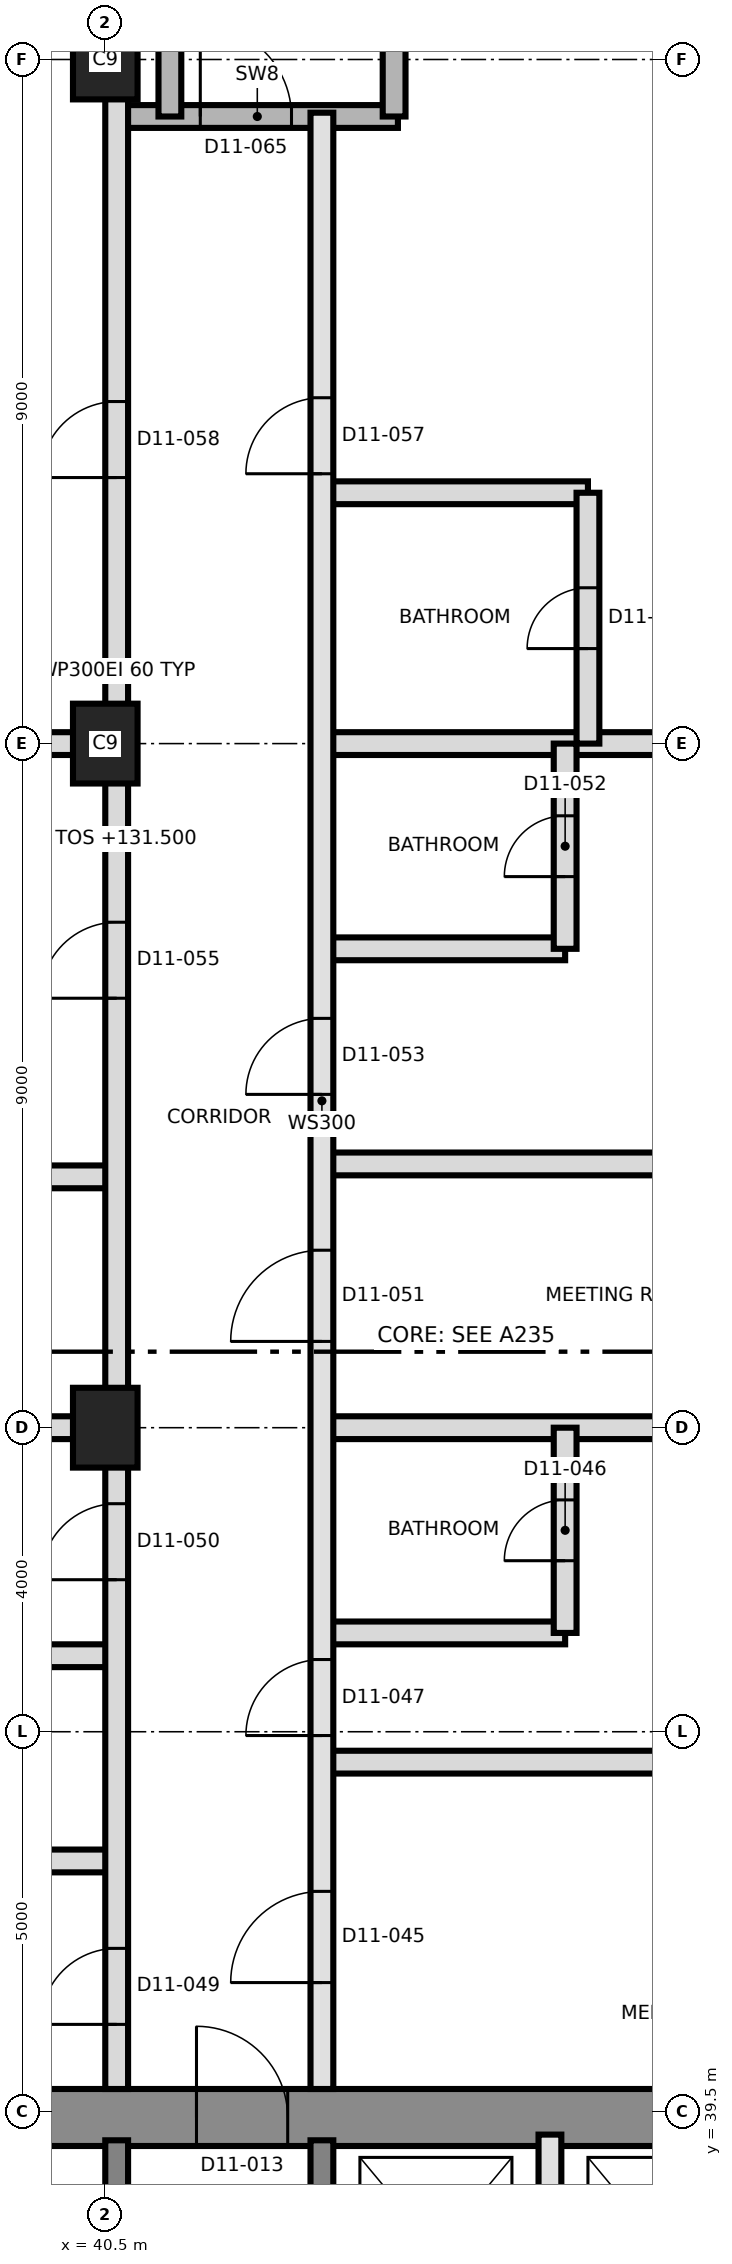
"""IFC4 building model, lengths in metres.
Left out: names, types, materials, properties, quantities, classifications, styles, units other than length and angle.
Written with IfcOpenShell. Run it as: python <this file> out.ifc"""

import sys

from ifc_helpers import new_model, si_unit, direction, frame, frame_2d, origin, origin_2d, place, context, subcontext, project, spatial, rectangle, extrude, element, fill, save


model = new_model("IFC4")
c1 = context("Model", 3, precision=1e-05, world=origin(), true_north=direction((0.0, 1.0)))
c2 = subcontext(c1, "Body", "Model", "MODEL_VIEW")
j1 = project(units=[si_unit("LENGTHUNIT", "METRE"), si_unit("PLANEANGLEUNIT", "RADIAN")], contexts=[c1])
p1 = place(None, origin())
s1 = spatial("IfcSite", under=j1, at=p1, CompositionType="ELEMENT")
p2 = place(p1, origin())
s2 = spatial("IfcBuilding", under=s1, at=p2, CompositionType="ELEMENT")
p3 = place(p2, frame((0.0, 0.0, 131.5)))
s3 = spatial("IfcBuildingStorey", under=s2, at=p3, CompositionType="ELEMENT", Elevation=131.5)
p4 = place(p3, frame((31.125, 39.425, 0.0), z_axis=(0.0, 0.0, 1.0), x_axis=(1.0, 0.0, 0.0)))
e1 = element("IfcWall", 1, at=p4, inside=s3, PredefinedType="SHEAR", context=c2, shape_type="SweptSolid", body=[
    extrude(rectangle(XDim=27.0, YDim=0.75, at=frame_2d((13.5, 0.0))), origin(), (0.0, 0.0, 1.0), 3.7),
])
p5 = place(p4, frame((10.575, 0.0, 0.0)))
e2 = element("IfcOpeningElement", 2, at=p5, cuts=e1, PredefinedType="OPENING", context=c2, shape_type="SweptSolid", body=[
    extrude(rectangle(XDim=1.2, YDim=2.1, at=frame_2d((0.6, 1.05))), frame((0.0, 0.385, 0.0), z_axis=(0.0, -1.0, 0.0), x_axis=(1.0, 0.0, 0.0)), (0.0, 0.0, 1.0), 0.77),
])
for number, where, z_axis, x_axis in (
    (3, (40.65, 33.5, 0.0), (0.0, 0.0, 1.0), (0.0, 1.0, 0.0)),
    (4, (43.35, 33.5, 0.0), (0.0, 0.0, 1.0), (0.0, 1.0, 0.0)),
):
    element("IfcWall", number, at=place(p3, frame(where, z_axis=z_axis, x_axis=x_axis)), inside=s3, PredefinedType="SHEAR", context=c2, shape_type="SweptSolid", body=[
        extrude(rectangle(XDim=5.625, YDim=0.3, at=frame_2d((2.812, 0.0))), origin(), (0.0, 0.0, 1.0), 3.7),
    ])
for number, where, z_axis, x_axis in (
    (5, (40.5, 48.5, 0.0), (0.0, 0.0, 1.0), (0.0, 1.0, 0.0)),
    (6, (40.5, 57.5, 0.0), (0.0, 0.0, 1.0), (0.0, 1.0, 0.0)),
    (7, (40.5, 66.5, 0.0), (0.0, 0.0, 1.0), (0.0, 1.0, 0.0)),
):
    element("IfcColumn", number, at=place(p3, frame(where, z_axis=z_axis, x_axis=x_axis)), inside=s3, PredefinedType="COLUMN", context=c2, shape_type="SweptSolid", body=[
        extrude(rectangle(XDim=1.05, YDim=0.85, at=origin_2d()), origin(), (0.0, 0.0, 1.0), 3.7),
    ])
p6 = place(p3, frame((46.35, 36.2, 0.0), z_axis=(0.0, 0.0, 1.0), x_axis=(0.0, 1.0, 0.0)))
e8 = element("IfcWall", 8, at=p6, inside=s3, PredefinedType="SOLIDWALL", context=c2, shape_type="SweptSolid", body=[
    extrude(rectangle(XDim=3.0, YDim=0.3, at=frame_2d((1.5, 0.0))), origin(), (0.0, 0.0, 1.0), 3.4),
])
p7 = place(p3, frame((37.45, 42.8, 0.0), z_axis=(0.0, 0.0, 1.0), x_axis=(1.0, 0.0, 0.0)))
e9 = element("IfcWall", 9, at=p7, inside=s3, PredefinedType="PARTITIONING", context=c2, shape_type="SweptSolid", body=[
    extrude(rectangle(XDim=3.2, YDim=0.3, at=frame_2d((1.6, 0.0))), origin(), (0.0, 0.0, 1.0), 3.4),
])
p8 = place(p3, frame((43.35, 44.1, 0.0), z_axis=(0.0, 0.0, 1.0), x_axis=(1.0, 0.0, 0.0)))
e10 = element("IfcWall", 10, at=p8, inside=s3, PredefinedType="PARTITIONING", context=c2, shape_type="SweptSolid", body=[
    extrude(rectangle(XDim=8.032, YDim=0.3, at=frame_2d((4.016, 0.0))), origin(), (0.0, 0.0, 1.0), 3.35),
])
p9 = place(p3, frame((30.135, 45.5, 0.0), z_axis=(0.0, 0.0, 1.0), x_axis=(1.0, 0.0, 0.0)))
e11 = element("IfcWall", 11, at=p9, inside=s3, PredefinedType="PARTITIONING", context=c2, shape_type="SweptSolid", body=[
    extrude(rectangle(XDim=10.515, YDim=0.3, at=frame_2d((5.257, 0.0))), origin(), (0.0, 0.0, 1.0), 3.35),
])
p10 = place(p3, frame((43.35, 45.8, 0.0), z_axis=(0.0, 0.0, 1.0), x_axis=(1.0, 0.0, 0.0)))
e12 = element("IfcWall", 12, at=p10, inside=s3, PredefinedType="PARTITIONING", context=c2, shape_type="SweptSolid", body=[
    extrude(rectangle(XDim=3.2, YDim=0.3, at=frame_2d((1.6, 0.0))), origin(), (0.0, 0.0, 1.0), 3.4),
])
p11 = place(p3, frame((30.135, 48.5, 0.0), z_axis=(0.0, 0.0, 1.0), x_axis=(1.0, 0.0, 0.0)))
e13 = element("IfcWall", 13, at=p11, inside=s3, PredefinedType="PARTITIONING", context=c2, shape_type="SweptSolid", body=[
    extrude(rectangle(XDim=10.515, YDim=0.3, at=frame_2d((5.257, 0.0))), origin(), (0.0, 0.0, 1.0), 3.35),
])
p12 = place(p3, frame((43.35, 48.5, 0.0), z_axis=(0.0, 0.0, 1.0), x_axis=(1.0, 0.0, 0.0)))
e14 = element("IfcWall", 14, at=p12, inside=s3, PredefinedType="PARTITIONING", context=c2, shape_type="SweptSolid", body=[
    extrude(rectangle(XDim=7.695, YDim=0.3, at=frame_2d((3.847, 0.0))), origin(), (0.0, 0.0, 1.0), 3.35),
])
p13 = place(p3, frame((37.15, 51.8, 0.0), z_axis=(0.0, 0.0, 1.0), x_axis=(1.0, 0.0, 0.0)))
e15 = element("IfcWall", 15, at=p13, inside=s3, PredefinedType="PARTITIONING", context=c2, shape_type="SweptSolid", body=[
    extrude(rectangle(XDim=3.5, YDim=0.3, at=frame_2d((1.75, 0.0))), origin(), (0.0, 0.0, 1.0), 3.4),
])
p14 = place(p3, frame((43.35, 51.97, 0.0), z_axis=(0.0, 0.0, 1.0), x_axis=(1.0, 0.0, 0.0)))
e16 = element("IfcWall", 16, at=p14, inside=s3, PredefinedType="PARTITIONING", context=c2, shape_type="SweptSolid", body=[
    extrude(rectangle(XDim=7.695, YDim=0.3, at=frame_2d((3.847, 0.0))), origin(), (0.0, 0.0, 1.0), 3.35),
])
p15 = place(p3, frame((43.35, 54.8, 0.0), z_axis=(0.0, 0.0, 1.0), x_axis=(1.0, 0.0, 0.0)))
e17 = element("IfcWall", 17, at=p15, inside=s3, PredefinedType="PARTITIONING", context=c2, shape_type="SweptSolid", body=[
    extrude(rectangle(XDim=3.2, YDim=0.3, at=frame_2d((1.6, 0.0))), origin(), (0.0, 0.0, 1.0), 3.4),
])
p16 = place(p3, frame((30.135, 57.5, 0.0), z_axis=(0.0, 0.0, 1.0), x_axis=(1.0, 0.0, 0.0)))
e18 = element("IfcWall", 18, at=p16, inside=s3, PredefinedType="PARTITIONING", context=c2, shape_type="SweptSolid", body=[
    extrude(rectangle(XDim=10.515, YDim=0.3, at=frame_2d((5.257, 0.0))), origin(), (0.0, 0.0, 1.0), 3.35),
])
p17 = place(p3, frame((43.35, 57.5, 0.0), z_axis=(0.0, 0.0, 1.0), x_axis=(1.0, 0.0, 0.0)))
e19 = element("IfcWall", 19, at=p17, inside=s3, PredefinedType="PARTITIONING", context=c2, shape_type="SweptSolid", body=[
    extrude(rectangle(XDim=7.695, YDim=0.3, at=frame_2d((3.847, 0.0))), origin(), (0.0, 0.0, 1.0), 3.35),
])
p18 = place(p3, frame((43.35, 60.8, 0.0), z_axis=(0.0, 0.0, 1.0), x_axis=(1.0, 0.0, 0.0)))
e20 = element("IfcWall", 20, at=p18, inside=s3, PredefinedType="PARTITIONING", context=c2, shape_type="SweptSolid", body=[
    extrude(rectangle(XDim=3.5, YDim=0.3, at=frame_2d((1.75, 0.0))), origin(), (0.0, 0.0, 1.0), 3.4),
])
p19 = place(p3, frame((40.65, 65.75, 0.0), z_axis=(0.0, 0.0, 1.0), x_axis=(1.0, 0.0, 0.0)))
e21 = element("IfcWall", 21, at=p19, inside=s3, PredefinedType="SHEAR", context=c2, shape_type="SweptSolid", body=[
    extrude(rectangle(XDim=3.7, YDim=0.3, at=frame_2d((1.85, 0.0))), origin(), (0.0, 0.0, 1.0), 3.4),
])
p20 = place(p19, frame((1.1, 0.0, 0.0)))
e22 = element("IfcOpeningElement", 22, at=p20, cuts=e21, PredefinedType="OPENING", context=c2, shape_type="SweptSolid", body=[
    extrude(rectangle(XDim=1.2, YDim=2.1, at=frame_2d((0.6, 1.05))), frame((0.0, 0.16, 0.0), z_axis=(0.0, -1.0, 0.0), x_axis=(1.0, 0.0, 0.0)), (0.0, 0.0, 1.0), 0.32),
])
p21 = place(p3, frame((40.65, 39.8, 0.0), z_axis=(0.0, 0.0, 1.0), x_axis=(0.0, 1.0, 0.0)))
e23 = element("IfcWall", 23, at=p21, inside=s3, PredefinedType="PARTITIONING", context=c2, shape_type="SweptSolid", body=[
    extrude(rectangle(XDim=37.305, YDim=0.3, at=frame_2d((18.652, 0.0))), origin(), (0.0, 0.0, 1.0), 3.35),
])
p22 = place(p21, frame((0.85, 0.0, 0.0)))
e24 = element("IfcOpeningElement", 24, at=p22, cuts=e23, PredefinedType="OPENING", context=c2, shape_type="SweptSolid", body=[
    extrude(rectangle(XDim=1.0, YDim=2.1, at=frame_2d((0.5, 1.05))), frame((0.0, 0.16, 0.0), z_axis=(0.0, -1.0, 0.0), x_axis=(1.0, 0.0, 0.0)), (0.0, 0.0, 1.0), 0.32),
])
p23 = place(p21, frame((6.7, 0.0, 0.0)))
e25 = element("IfcOpeningElement", 25, at=p23, cuts=e23, PredefinedType="OPENING", context=c2, shape_type="SweptSolid", body=[
    extrude(rectangle(XDim=1.0, YDim=2.1, at=frame_2d((0.5, 1.05))), frame((0.0, 0.16, 0.0), z_axis=(0.0, -1.0, 0.0), x_axis=(1.0, 0.0, 0.0)), (0.0, 0.0, 1.0), 0.32),
])
p24 = place(p21, frame((14.35, 0.0, 0.0)))
e26 = element("IfcOpeningElement", 26, at=p24, cuts=e23, PredefinedType="OPENING", context=c2, shape_type="SweptSolid", body=[
    extrude(rectangle(XDim=1.0, YDim=2.4, at=frame_2d((0.5, 1.2))), frame((0.0, 0.16, 0.0), z_axis=(0.0, -1.0, 0.0), x_axis=(1.0, 0.0, 0.0)), (0.0, 0.0, 1.0), 0.32),
])
p25 = place(p21, frame((21.2, 0.0, 0.0)))
e27 = element("IfcOpeningElement", 27, at=p25, cuts=e23, PredefinedType="OPENING", context=c2, shape_type="SweptSolid", body=[
    extrude(rectangle(XDim=1.0, YDim=2.4, at=frame_2d((0.5, 1.2))), frame((0.0, 0.16, 0.0), z_axis=(0.0, -1.0, 0.0), x_axis=(1.0, 0.0, 0.0)), (0.0, 0.0, 1.0), 0.32),
])
p26 = place(p3, frame((41.35, 65.75, 0.0), z_axis=(0.0, 0.0, 1.0), x_axis=(0.0, 1.0, 0.0)))
e28 = element("IfcWall", 28, at=p26, inside=s3, PredefinedType="SHEAR", context=c2, shape_type="SweptSolid", body=[
    extrude(rectangle(XDim=8.85, YDim=0.3, at=frame_2d((4.425, 0.0))), origin(), (0.0, 0.0, 1.0), 3.4),
])
p27 = place(p3, frame((43.35, 39.8, 0.0), z_axis=(0.0, 0.0, 1.0), x_axis=(0.0, 1.0, 0.0)))
e29 = element("IfcWall", 29, at=p27, inside=s3, PredefinedType="SOLIDWALL", context=c2, shape_type="SweptSolid", body=[
    extrude(rectangle(XDim=26.0, YDim=0.3, at=frame_2d((13.0, 0.0))), origin(), (0.0, 0.0, 1.0), 3.4),
])
p28 = place(p27, frame((1.4, 0.0, 0.0)))
e30 = element("IfcOpeningElement", 30, at=p28, cuts=e29, PredefinedType="OPENING", context=c2, shape_type="SweptSolid", body=[
    extrude(rectangle(XDim=1.2, YDim=2.1, at=frame_2d((0.6, 1.05))), frame((0.0, 0.16, 0.0), z_axis=(0.0, -1.0, 0.0), x_axis=(1.0, 0.0, 0.0)), (0.0, 0.0, 1.0), 0.32),
])
p29 = place(p27, frame((4.65, 0.0, 0.0)))
e31 = element("IfcOpeningElement", 31, at=p29, cuts=e29, PredefinedType="OPENING", context=c2, shape_type="SweptSolid", body=[
    extrude(rectangle(XDim=1.0, YDim=2.1, at=frame_2d((0.5, 1.05))), frame((0.0, 0.16, 0.0), z_axis=(0.0, -1.0, 0.0), x_axis=(1.0, 0.0, 0.0)), (0.0, 0.0, 1.0), 0.32),
])
p30 = place(p27, frame((9.835, 0.0, 0.0)))
e32 = element("IfcOpeningElement", 32, at=p30, cuts=e29, PredefinedType="OPENING", context=c2, shape_type="SweptSolid", body=[
    extrude(rectangle(XDim=1.2, YDim=2.1, at=frame_2d((0.6, 1.05))), frame((0.0, 0.16, 0.0), z_axis=(0.0, -1.0, 0.0), x_axis=(1.0, 0.0, 0.0)), (0.0, 0.0, 1.0), 0.32),
])
p31 = place(p27, frame((13.085, 0.0, 0.0)))
e33 = element("IfcOpeningElement", 33, at=p31, cuts=e29, PredefinedType="OPENING", context=c2, shape_type="SweptSolid", body=[
    extrude(rectangle(XDim=1.0, YDim=2.1, at=frame_2d((0.5, 1.05))), frame((0.0, 0.16, 0.0), z_axis=(0.0, -1.0, 0.0), x_axis=(1.0, 0.0, 0.0)), (0.0, 0.0, 1.0), 0.32),
])
p32 = place(p27, frame((21.25, 0.0, 0.0)))
e34 = element("IfcOpeningElement", 34, at=p32, cuts=e29, PredefinedType="OPENING", context=c2, shape_type="SweptSolid", body=[
    extrude(rectangle(XDim=1.0, YDim=2.4, at=frame_2d((0.5, 1.2))), frame((0.0, 0.16, 0.0), z_axis=(0.0, -1.0, 0.0), x_axis=(1.0, 0.0, 0.0)), (0.0, 0.0, 1.0), 0.32),
])
p33 = place(p3, frame((44.3, 65.75, 0.0), z_axis=(0.0, 0.0, 1.0), x_axis=(0.0, 1.0, 0.0)))
e35 = element("IfcWall", 35, at=p33, inside=s3, PredefinedType="SHEAR", context=c2, shape_type="SweptSolid", body=[
    extrude(rectangle(XDim=8.85, YDim=0.3, at=frame_2d((4.425, 0.0))), origin(), (0.0, 0.0, 1.0), 3.4),
])
p34 = place(p3, frame((46.55, 45.8, 0.0), z_axis=(0.0, 0.0, 1.0), x_axis=(0.0, 1.0, 0.0)))
e36 = element("IfcWall", 36, at=p34, inside=s3, PredefinedType="PARTITIONING", context=c2, shape_type="SweptSolid", body=[
    extrude(rectangle(XDim=2.7, YDim=0.3, at=frame_2d((1.35, 0.0))), origin(), (0.0, 0.0, 1.0), 3.4),
])
p35 = place(p34, frame((0.95, 0.0, 0.0)))
e37 = element("IfcOpeningElement", 37, at=p35, cuts=e36, PredefinedType="OPENING", context=c2, shape_type="SweptSolid", body=[
    extrude(rectangle(XDim=0.8, YDim=2.1, at=frame_2d((0.4, 1.05))), frame((0.0, 0.16, 0.0), z_axis=(0.0, -1.0, 0.0), x_axis=(1.0, 0.0, 0.0)), (0.0, 0.0, 1.0), 0.32),
])
p36 = place(p3, frame((46.55, 54.8, 0.0), z_axis=(0.0, 0.0, 1.0), x_axis=(0.0, 1.0, 0.0)))
e38 = element("IfcWall", 38, at=p36, inside=s3, PredefinedType="PARTITIONING", context=c2, shape_type="SweptSolid", body=[
    extrude(rectangle(XDim=2.7, YDim=0.3, at=frame_2d((1.35, 0.0))), origin(), (0.0, 0.0, 1.0), 3.4),
])
p37 = place(p36, frame((0.95, 0.0, 0.0)))
e39 = element("IfcOpeningElement", 39, at=p37, cuts=e38, PredefinedType="OPENING", context=c2, shape_type="SweptSolid", body=[
    extrude(rectangle(XDim=0.8, YDim=2.1, at=frame_2d((0.4, 1.05))), frame((0.0, 0.16, 0.0), z_axis=(0.0, -1.0, 0.0), x_axis=(1.0, 0.0, 0.0)), (0.0, 0.0, 1.0), 0.32),
])
p38 = place(p3, frame((46.85, 57.5, 0.0), z_axis=(0.0, 0.0, 1.0), x_axis=(0.0, 1.0, 0.0)))
e40 = element("IfcWall", 40, at=p38, inside=s3, PredefinedType="PARTITIONING", context=c2, shape_type="SweptSolid", body=[
    extrude(rectangle(XDim=3.3, YDim=0.3, at=frame_2d((1.65, 0.0))), origin(), (0.0, 0.0, 1.0), 3.4),
])
p39 = place(p38, frame((1.25, 0.0, 0.0)))
e41 = element("IfcOpeningElement", 41, at=p39, cuts=e40, PredefinedType="OPENING", context=c2, shape_type="SweptSolid", body=[
    extrude(rectangle(XDim=0.8, YDim=2.1, at=frame_2d((0.4, 1.05))), frame((0.0, 0.16, 0.0), z_axis=(0.0, -1.0, 0.0), x_axis=(1.0, 0.0, 0.0)), (0.0, 0.0, 1.0), 0.32),
])
p40 = place(p5, origin())
e42 = element("IfcDoor", 42, at=p40, inside=s3, OperationType="SINGLE_SWING_RIGHT", PredefinedType="DOOR", context=c2, shape_type="SweptSolid", body=[
    extrude(rectangle(XDim=1.2, YDim=2.1, at=frame_2d((0.6, 1.05))), frame((0.0, 0.025, 0.0), z_axis=(0.0, -1.0, 0.0), x_axis=(1.0, 0.0, 0.0)), (0.0, 0.0, 1.0), 0.05),
])
fill(e2, e42)
p41 = place(p28, origin())
e43 = element("IfcDoor", 43, at=p41, inside=s3, OperationType="SINGLE_SWING_LEFT", PredefinedType="DOOR", context=c2, shape_type="SweptSolid", body=[
    extrude(rectangle(XDim=1.2, YDim=2.1, at=frame_2d((0.6, 1.05))), frame((0.0, 0.025, 0.0), z_axis=(0.0, -1.0, 0.0), x_axis=(1.0, 0.0, 0.0)), (0.0, 0.0, 1.0), 0.05),
])
fill(e30, e43)
p42 = place(p35, origin())
e44 = element("IfcDoor", 44, at=p42, inside=s3, OperationType="SINGLE_SWING_RIGHT", PredefinedType="DOOR", context=c2, shape_type="SweptSolid", body=[
    extrude(rectangle(XDim=0.8, YDim=2.1, at=frame_2d((0.4, 1.05))), frame((0.0, 0.025, 0.0), z_axis=(0.0, -1.0, 0.0), x_axis=(1.0, 0.0, 0.0)), (0.0, 0.0, 1.0), 0.05),
])
fill(e37, e44)
p43 = place(p29, origin())
e45 = element("IfcDoor", 45, at=p43, inside=s3, OperationType="SINGLE_SWING_LEFT", PredefinedType="DOOR", context=c2, shape_type="SweptSolid", body=[
    extrude(rectangle(XDim=1.0, YDim=2.1, at=frame_2d((0.5, 1.05))), frame((0.0, 0.025, 0.0), z_axis=(0.0, -1.0, 0.0), x_axis=(1.0, 0.0, 0.0)), (0.0, 0.0, 1.0), 0.05),
])
fill(e31, e45)
p44 = place(p22, origin())
e46 = element("IfcDoor", 46, at=p44, inside=s3, OperationType="SINGLE_SWING_LEFT", PredefinedType="DOOR", context=c2, shape_type="SweptSolid", body=[
    extrude(rectangle(XDim=1.0, YDim=2.1, at=frame_2d((0.5, 1.05))), frame((0.0, 0.025, 0.0), z_axis=(0.0, -1.0, 0.0), x_axis=(1.0, 0.0, 0.0)), (0.0, 0.0, 1.0), 0.05),
])
fill(e24, e46)
p45 = place(p23, origin())
e47 = element("IfcDoor", 47, at=p45, inside=s3, OperationType="SINGLE_SWING_RIGHT", PredefinedType="DOOR", context=c2, shape_type="SweptSolid", body=[
    extrude(rectangle(XDim=1.0, YDim=2.1, at=frame_2d((0.5, 1.05))), frame((0.0, 0.025, 0.0), z_axis=(0.0, -1.0, 0.0), x_axis=(1.0, 0.0, 0.0)), (0.0, 0.0, 1.0), 0.05),
])
fill(e25, e47)
p46 = place(p30, origin())
e48 = element("IfcDoor", 48, at=p46, inside=s3, OperationType="SINGLE_SWING_LEFT", PredefinedType="DOOR", context=c2, shape_type="SweptSolid", body=[
    extrude(rectangle(XDim=1.2, YDim=2.1, at=frame_2d((0.6, 1.05))), frame((0.0, 0.025, 0.0), z_axis=(0.0, -1.0, 0.0), x_axis=(1.0, 0.0, 0.0)), (0.0, 0.0, 1.0), 0.05),
])
fill(e32, e48)
p47 = place(p37, origin())
e49 = element("IfcDoor", 49, at=p47, inside=s3, OperationType="SINGLE_SWING_RIGHT", PredefinedType="DOOR", context=c2, shape_type="SweptSolid", body=[
    extrude(rectangle(XDim=0.8, YDim=2.1, at=frame_2d((0.4, 1.05))), frame((0.0, 0.025, 0.0), z_axis=(0.0, -1.0, 0.0), x_axis=(1.0, 0.0, 0.0)), (0.0, 0.0, 1.0), 0.05),
])
fill(e39, e49)
p48 = place(p31, origin())
e50 = element("IfcDoor", 50, at=p48, inside=s3, OperationType="SINGLE_SWING_LEFT", PredefinedType="DOOR", context=c2, shape_type="SweptSolid", body=[
    extrude(rectangle(XDim=1.0, YDim=2.1, at=frame_2d((0.5, 1.05))), frame((0.0, 0.025, 0.0), z_axis=(0.0, -1.0, 0.0), x_axis=(1.0, 0.0, 0.0)), (0.0, 0.0, 1.0), 0.05),
])
fill(e33, e50)
p49 = place(p24, origin())
e51 = element("IfcDoor", 51, at=p49, inside=s3, OperationType="SINGLE_SWING_LEFT", PredefinedType="DOOR", context=c2, shape_type="SweptSolid", body=[
    extrude(rectangle(XDim=1.0, YDim=2.4, at=frame_2d((0.5, 1.2))), frame((0.0, 0.025, 0.0), z_axis=(0.0, -1.0, 0.0), x_axis=(1.0, 0.0, 0.0)), (0.0, 0.0, 1.0), 0.05),
])
fill(e26, e51)
p50 = place(p39, origin())
e52 = element("IfcDoor", 52, at=p50, inside=s3, OperationType="SINGLE_SWING_LEFT", PredefinedType="DOOR", context=c2, shape_type="SweptSolid", body=[
    extrude(rectangle(XDim=0.8, YDim=2.1, at=frame_2d((0.4, 1.05))), frame((0.0, 0.025, 0.0), z_axis=(0.0, -1.0, 0.0), x_axis=(1.0, 0.0, 0.0)), (0.0, 0.0, 1.0), 0.05),
])
fill(e41, e52)
p51 = place(p32, origin())
e53 = element("IfcDoor", 53, at=p51, inside=s3, OperationType="SINGLE_SWING_RIGHT", PredefinedType="DOOR", context=c2, shape_type="SweptSolid", body=[
    extrude(rectangle(XDim=1.0, YDim=2.4, at=frame_2d((0.5, 1.2))), frame((0.0, 0.025, 0.0), z_axis=(0.0, -1.0, 0.0), x_axis=(1.0, 0.0, 0.0)), (0.0, 0.0, 1.0), 0.05),
])
fill(e34, e53)
p52 = place(p25, origin())
e54 = element("IfcDoor", 54, at=p52, inside=s3, OperationType="SINGLE_SWING_LEFT", PredefinedType="DOOR", context=c2, shape_type="SweptSolid", body=[
    extrude(rectangle(XDim=1.0, YDim=2.4, at=frame_2d((0.5, 1.2))), frame((0.0, 0.025, 0.0), z_axis=(0.0, -1.0, 0.0), x_axis=(1.0, 0.0, 0.0)), (0.0, 0.0, 1.0), 0.05),
])
fill(e27, e54)
p53 = place(p20, origin())
e55 = element("IfcDoor", 55, at=p53, inside=s3, OperationType="SINGLE_SWING_RIGHT", PredefinedType="DOOR", context=c2, shape_type="SweptSolid", body=[
    extrude(rectangle(XDim=1.2, YDim=2.1, at=frame_2d((0.6, 1.05))), frame((0.0, 0.025, 0.0), z_axis=(0.0, -1.0, 0.0), x_axis=(1.0, 0.0, 0.0)), (0.0, 0.0, 1.0), 0.05),
])
fill(e22, e55)
save(model, sys.argv[1])
